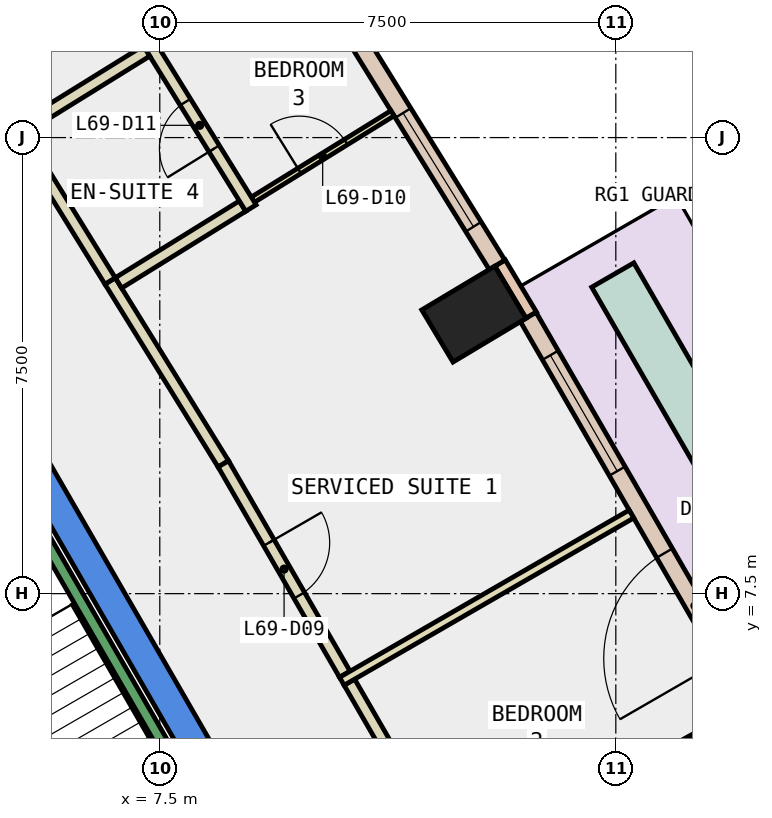
"""IFC4 building model, lengths in metres.
Left out: names, types, materials, properties, quantities, classifications, styles, units other than length and angle.
Written with IfcOpenShell. Run it as: python <this file> out.ifc"""

import sys

from ifc_helpers import new_model, si_unit, direction, frame, frame_2d, origin, origin_2d, place, context, subcontext, project, spatial, polyline, rectangle, outline, extrude, element, fill, save


model = new_model("IFC4")
c1 = context("Model", 3, precision=1e-05, world=origin(), true_north=direction((0.0, 1.0)))
c2 = subcontext(c1, "Body", "Model", "MODEL_VIEW")
j1 = project(units=[si_unit("LENGTHUNIT", "METRE"), si_unit("PLANEANGLEUNIT", "RADIAN")], contexts=[c1])
p1 = place(None, origin())
s1 = spatial("IfcSite", under=j1, at=p1, CompositionType="ELEMENT")
p2 = place(p1, origin())
s2 = spatial("IfcBuilding", under=s1, at=p2, CompositionType="ELEMENT")
p3 = place(p2, frame((0.0, 0.0, 297.2)))
s3 = spatial("IfcBuildingStorey", under=s2, at=p3, CompositionType="ELEMENT", Elevation=297.2)
for number, where, z_axis, x_axis in (
    (1, (16.809, 4.921, -0.34), (0.0, 0.0, 1.0), (-0.486, 0.874, 0.0)),
    (2, (12.666, 12.097, -0.34), (0.0, 0.0, 1.0), (-0.514, 0.858, 0.0)),
):
    element("IfcColumn", number, at=place(p3, frame(where, z_axis=z_axis, x_axis=x_axis)), inside=s3, PredefinedType="COLUMN", context=c2, shape_type="SweptSolid", body=[
        extrude(rectangle(XDim=1.0, YDim=1.4, at=origin_2d()), origin(), (0.0, 0.0, 1.0), 3.6),
    ])
p4 = place(p3, frame((0.0, 0.0, -0.34)))
e3 = element("IfcWall", 3, at=p4, inside=s3, PredefinedType="SHEAR", context=c2, shape_type="SweptSolid", body=[
    extrude(outline(polyline([(5.486, 9.998), (5.053, 9.748), (9.238, 2.5), (9.815, 2.5), (5.486, 9.998)])), origin(), (0.0, 0.0, 1.0), 3.6),
])
p5 = place(p3, frame((13.609, 12.08, 0.0), z_axis=(0.0, 0.0, 1.0), x_axis=(-0.513885310016, 0.857858897576, 0.0)))
e4 = element("IfcWall", 4, at=p5, inside=s3, PredefinedType="STANDARD", context=c2, shape_type="SweptSolid", body=[
    extrude(rectangle(XDim=1.0, YDim=0.2, at=frame_2d((0.5, 0.0))), origin(), (0.0, 0.0, 1.0), 3.26),
])
p6 = place(p3, frame((17.215, 5.717, 0.0), z_axis=(0.0, 0.0, 1.0), x_axis=(-0.499905472729, 0.866079972252, 0.0)))
e5 = element("IfcWall", 5, at=p6, inside=s3, PredefinedType="STANDARD", context=c2, shape_type="SweptSolid", body=[
    extrude(rectangle(XDim=7.313, YDim=0.3, at=frame_2d((3.657, 0.0))), origin(), (0.0, 0.0, 1.0), 3.26),
])
p7 = place(p6, frame((0.828, 0.0, 0.0)))
e6 = element("IfcOpeningElement", 6, at=p7, cuts=e5, PredefinedType="OPENING", context=c2, shape_type="SweptSolid", body=[
    extrude(rectangle(XDim=2.0, YDim=2.4, at=frame_2d((1.0, 1.2))), frame((0.0, 0.16, 0.0), z_axis=(0.0, -1.0, 0.0), x_axis=(1.0, 0.0, 0.0)), (0.0, 0.0, 1.0), 0.32),
])
p8 = place(p6, frame((4.385, 0.0, 0.9)))
e7 = element("IfcOpeningElement", 7, at=p8, cuts=e5, PredefinedType="OPENING", context=c2, shape_type="SweptSolid", body=[
    extrude(rectangle(XDim=2.2, YDim=2.0, at=frame_2d((1.1, 1.0))), frame((0.0, 0.16, 0.0), z_axis=(0.0, -1.0, 0.0), x_axis=(1.0, 0.0, 0.0)), (0.0, 0.0, 1.0), 0.32),
])
p9 = place(p3, frame((13.047, 12.907, 0.0), z_axis=(0.0, 0.0, 1.0), x_axis=(-0.526409529565, 0.850231149267, 0.0)))
e8 = element("IfcWall", 8, at=p9, inside=s3, PredefinedType="STANDARD", context=c2, shape_type="SweptSolid", body=[
    extrude(rectangle(XDim=7.346, YDim=0.3, at=frame_2d((3.673, 0.0))), origin(), (0.0, 0.0, 1.0), 3.26),
])
p10 = place(p9, frame((0.737, 0.0, 0.9)))
e9 = element("IfcOpeningElement", 9, at=p10, cuts=e8, PredefinedType="OPENING", context=c2, shape_type="SweptSolid", body=[
    extrude(rectangle(XDim=2.2, YDim=2.0, at=frame_2d((1.1, 1.0))), frame((0.0, 0.16, 0.0), z_axis=(0.0, -1.0, 0.0), x_axis=(1.0, 0.0, 0.0)), (0.0, 0.0, 1.0), 0.32),
])
p11 = place(p9, frame((4.41, 0.0, 0.9)))
e10 = element("IfcOpeningElement", 10, at=p11, cuts=e8, PredefinedType="OPENING", context=c2, shape_type="SweptSolid", body=[
    extrude(rectangle(XDim=2.2, YDim=2.0, at=frame_2d((1.1, 1.0))), frame((0.0, 0.16, 0.0), z_axis=(0.0, -1.0, 0.0), x_axis=(1.0, 0.0, 0.0)), (0.0, 0.0, 1.0), 0.32),
])
p12 = place(p3, frame((18.508, 6.578, 0.0), z_axis=(0.0, 0.0, 1.0), x_axis=(-0.500043210338, 0.866000454847, 0.0)))
e11 = element("IfcWall", 11, at=p12, inside=s3, PredefinedType="STANDARD", context=c2, shape_type="SweptSolid", body=[
    extrude(rectangle(XDim=7.115, YDim=0.8, at=frame_2d((3.558, 0.0))), origin(), (0.0, 0.0, 1.0), 0.8),
])
p13 = place(p3, frame((10.618, 6.044, 0.0), z_axis=(0.0, 0.0, 1.0), x_axis=(0.50008212199, -0.86597798544, 0.0)))
e12 = element("IfcWall", 12, at=p13, inside=s3, PredefinedType="PARTITIONING", context=c2, shape_type="SweptSolid", body=[
    extrude(rectangle(XDim=3.995, YDim=0.2, at=frame_2d((1.998, 0.0))), origin(), (0.0, 0.0, 1.0), 3.26),
])
p14 = place(p3, frame((6.683, 12.642, 0.0), z_axis=(0.0, 0.0, 1.0), x_axis=(0.526290465295, -0.850304854825, 0.0)))
e13 = element("IfcWall", 13, at=p14, inside=s3, PredefinedType="PARTITIONING", context=c2, shape_type="SweptSolid", body=[
    extrude(rectangle(XDim=3.538, YDim=0.2, at=frame_2d((1.769, 0.0))), origin(), (0.0, 0.0, 1.0), 3.26),
])
p15 = place(p3, frame((8.545, 9.634, 0.0), z_axis=(0.0, 0.0, 1.0), x_axis=(0.50008212199, -0.86597798544, 0.0)))
e14 = element("IfcWall", 14, at=p15, inside=s3, PredefinedType="PARTITIONING", context=c2, shape_type="SweptSolid", body=[
    extrude(rectangle(XDim=3.995, YDim=0.2, at=frame_2d((1.998, 0.0))), origin(), (0.0, 0.0, 1.0), 3.26),
])
p16 = place(p15, frame((1.498, 0.0, 0.0)))
e15 = element("IfcOpeningElement", 15, at=p16, cuts=e14, PredefinedType="OPENING", context=c2, shape_type="SweptSolid", body=[
    extrude(rectangle(XDim=1.0, YDim=2.1, at=frame_2d((0.5, 1.05))), frame((0.0, 0.11, 0.0), z_axis=(0.0, -1.0, 0.0), x_axis=(1.0, 0.0, 0.0)), (0.0, 0.0, 1.0), 0.22),
])
p17 = place(p3, frame((5.104, 15.193, 0.0), z_axis=(0.0, 0.0, 1.0), x_axis=(0.526329401671, -0.850280754184, 0.0)))
e16 = element("IfcWall", 16, at=p17, inside=s3, PredefinedType="PARTITIONING", context=c2, shape_type="SweptSolid", body=[
    extrude(rectangle(XDim=3.0, YDim=0.2, at=frame_2d((1.5, 0.0))), origin(), (0.0, 0.0, 1.0), 3.26),
])
p18 = place(p3, frame((10.494, 6.059, 0.0), z_axis=(0.0, 0.0, 1.0), x_axis=(0.866027397988, 0.499996545922, 0.0)))
e17 = element("IfcWall", 17, at=p18, inside=s3, PredefinedType="PARTITIONING", context=c2, shape_type="SweptSolid", body=[
    extrude(rectangle(XDim=5.5, YDim=0.15, at=frame_2d((2.75, 0.0))), origin(), (0.0, 0.0, 1.0), 3.26),
])
p19 = place(p3, frame((9.031, 13.979, 0.0), z_axis=(0.0, 0.0, 1.0), x_axis=(0.85032680557, 0.526254998768, 0.0)))
e18 = element("IfcWall", 18, at=p19, inside=s3, PredefinedType="PARTITIONING", context=c2, shape_type="SweptSolid", body=[
    extrude(rectangle(XDim=2.7, YDim=0.1, at=frame_2d((1.35, 0.0))), origin(), (0.0, 0.0, 1.0), 3.26),
])
p20 = place(p19, frame((0.9, 0.0, 0.0)))
e19 = element("IfcOpeningElement", 19, at=p20, cuts=e18, PredefinedType="OPENING", context=c2, shape_type="SweptSolid", body=[
    extrude(rectangle(XDim=0.9, YDim=2.1, at=frame_2d((0.45, 1.05))), frame((0.0, 0.06, 0.0), z_axis=(0.0, -1.0, 0.0), x_axis=(1.0, 0.0, 0.0)), (0.0, 0.0, 1.0), 0.12),
])
p21 = place(p3, frame((6.821, 12.61, 0.0), z_axis=(0.0, 0.0, 1.0), x_axis=(0.850254303895, 0.526372129494, 0.0)))
e20 = element("IfcWall", 20, at=p21, inside=s3, PredefinedType="PARTITIONING", context=c2, shape_type="SweptSolid", body=[
    extrude(rectangle(XDim=2.399, YDim=0.2, at=frame_2d((1.2, 0.0))), origin(), (0.0, 0.0, 1.0), 3.26),
])
p22 = place(p3, frame((8.999, 13.841, 0.0), z_axis=(0.0, 0.0, 1.0), x_axis=(-0.526283695852, 0.850309044689, 0.0)))
e21 = element("IfcWall", 21, at=p22, inside=s3, PredefinedType="PARTITIONING", context=c2, shape_type="SweptSolid", body=[
    extrude(rectangle(XDim=3.2, YDim=0.2, at=frame_2d((1.6, 0.0))), origin(), (0.0, 0.0, 1.0), 3.26),
])
p23 = place(p22, frame((1.15, 0.0, 0.0)))
e22 = element("IfcOpeningElement", 22, at=p23, cuts=e21, PredefinedType="OPENING", context=c2, shape_type="SweptSolid", body=[
    extrude(rectangle(XDim=0.9, YDim=2.1, at=frame_2d((0.45, 1.05))), frame((0.0, 0.11, 0.0), z_axis=(0.0, -1.0, 0.0), x_axis=(1.0, 0.0, 0.0)), (0.0, 0.0, 1.0), 0.22),
])
p24 = place(p3, frame((7.282, 16.424, 0.0), z_axis=(0.0, 0.0, 1.0), x_axis=(-0.850142312258, -0.526552987751, 0.0)))
e23 = element("IfcWall", 23, at=p24, inside=s3, PredefinedType="PARTITIONING", context=c2, shape_type="SweptSolid", body=[
    extrude(rectangle(XDim=2.5, YDim=0.2, at=frame_2d((1.25, 0.0))), origin(), (0.0, 0.0, 1.0), 3.26),
])
p25 = place(p3, frame((4.445, 16.068, 0.0), z_axis=(0.0, 0.0, 1.0), x_axis=(0.785872006963, 0.618389188677, 0.0)))
e24 = element("IfcWall", 24, at=p25, inside=s3, PredefinedType="PARTITIONING", context=c2, shape_type="SweptSolid", body=[
    extrude(rectangle(XDim=4.216, YDim=0.15, at=frame_2d((2.108, 0.0))), origin(), (0.0, 0.0, 1.0), 3.26),
])
p26 = place(p3, frame((8.48, 3.412, 0.0), z_axis=(0.0, 0.0, 1.0), x_axis=(-0.499978703459, 0.866037698999, 0.0)))
e25 = element("IfcWall", 25, at=p26, inside=s3, PredefinedType="STANDARD", context=c2, shape_type="SweptSolid", body=[
    extrude(rectangle(XDim=6.9, YDim=0.2, at=frame_2d((3.45, 0.0))), origin(), (0.0, 0.0, 1.0), 3.26),
])
p27 = place(p7, origin())
e26 = element("IfcDoor", 26, at=p27, inside=s3, OperationType="SLIDING_TO_LEFT", PredefinedType="DOOR", context=c2, shape_type="SweptSolid", body=[
    extrude(rectangle(XDim=2.0, YDim=2.4, at=frame_2d((1.0, 1.2))), frame((0.0, 0.025, 0.0), z_axis=(0.0, -1.0, 0.0), x_axis=(1.0, 0.0, 0.0)), (0.0, 0.0, 1.0), 0.05),
])
fill(e6, e26)
p28 = place(p8, origin())
e27 = element("IfcWindow", 27, at=p28, inside=s3, PartitioningType="SINGLE_PANEL", PredefinedType="WINDOW", context=c2, shape_type="SweptSolid", body=[
    extrude(rectangle(XDim=2.2, YDim=2.0, at=frame_2d((1.1, 1.0))), frame((0.0, 0.03, 0.0), z_axis=(0.0, -1.0, 0.0), x_axis=(1.0, 0.0, 0.0)), (0.0, 0.0, 1.0), 0.06),
])
fill(e7, e27)
p29 = place(p10, origin())
e28 = element("IfcWindow", 28, at=p29, inside=s3, PartitioningType="SINGLE_PANEL", PredefinedType="WINDOW", context=c2, shape_type="SweptSolid", body=[
    extrude(rectangle(XDim=2.2, YDim=2.0, at=frame_2d((1.1, 1.0))), frame((0.0, 0.03, 0.0), z_axis=(0.0, -1.0, 0.0), x_axis=(1.0, 0.0, 0.0)), (0.0, 0.0, 1.0), 0.06),
])
fill(e9, e28)
p30 = place(p16, origin())
e29 = element("IfcDoor", 29, at=p30, inside=s3, OperationType="SINGLE_SWING_LEFT", PredefinedType="DOOR", context=c2, shape_type="SweptSolid", body=[
    extrude(rectangle(XDim=1.0, YDim=2.1, at=frame_2d((0.5, 1.05))), frame((0.0, 0.025, 0.0), z_axis=(0.0, -1.0, 0.0), x_axis=(1.0, 0.0, 0.0)), (0.0, 0.0, 1.0), 0.05),
])
fill(e15, e29)
p31 = place(p20, origin())
e30 = element("IfcDoor", 30, at=p31, inside=s3, OperationType="SINGLE_SWING_LEFT", PredefinedType="DOOR", context=c2, shape_type="SweptSolid", body=[
    extrude(rectangle(XDim=0.9, YDim=2.1, at=frame_2d((0.45, 1.05))), frame((0.0, 0.025, 0.0), z_axis=(0.0, -1.0, 0.0), x_axis=(1.0, 0.0, 0.0)), (0.0, 0.0, 1.0), 0.05),
])
fill(e19, e30)
p32 = place(p23, origin())
e31 = element("IfcDoor", 31, at=p32, inside=s3, OperationType="SINGLE_SWING_RIGHT", PredefinedType="DOOR", context=c2, shape_type="SweptSolid", body=[
    extrude(rectangle(XDim=0.9, YDim=2.1, at=frame_2d((0.45, 1.05))), frame((0.0, 0.025, 0.0), z_axis=(0.0, -1.0, 0.0), x_axis=(1.0, 0.0, 0.0)), (0.0, 0.0, 1.0), 0.05),
])
fill(e22, e31)
save(model, sys.argv[1])
